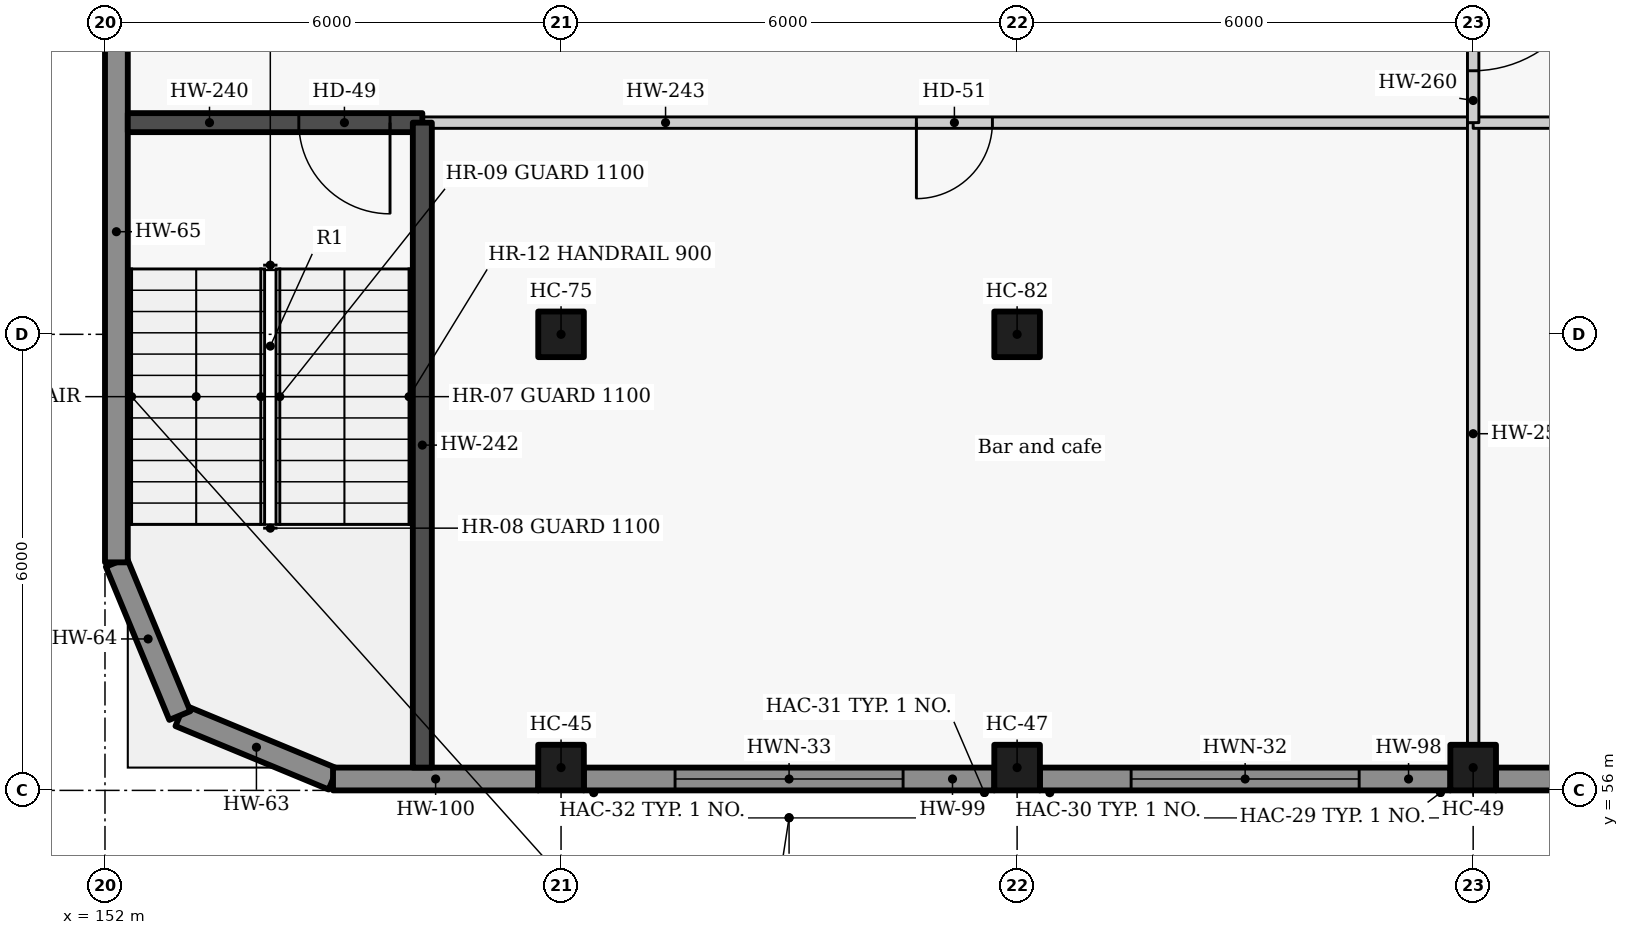
"""IFC4 building model, lengths in metres.
Left out: names, types, materials, properties, quantities, classifications, styles, units other than length and angle.
Written with IfcOpenShell. Run it as: python <this file> out.ifc"""

import sys

from ifc_helpers import new_model, si_unit, direction, frame, frame_2d, origin, origin_2d, place, context, subcontext, project, spatial, rectangle, extrude, element, fill, save


model = new_model("IFC4")
c1 = context("Model", 3, precision=1e-05, world=origin(), true_north=direction((0.0, 1.0)))
c2 = subcontext(c1, "Body", "Model", "MODEL_VIEW")
j1 = project(units=[si_unit("LENGTHUNIT", "METRE"), si_unit("PLANEANGLEUNIT", "RADIAN")], contexts=[c1])
p1 = place(None, origin())
s1 = spatial("IfcSite", under=j1, at=p1, CompositionType="ELEMENT")
p2 = place(p1, origin())
s2 = spatial("IfcBuilding", under=s1, at=p2, CompositionType="ELEMENT")
p3 = place(p2, frame((0.0, 0.0, 6.6)))
s3 = spatial("IfcBuildingStorey", under=s2, at=p3, CompositionType="ELEMENT", Elevation=6.6)
for number, where, z_axis, x_axis in (
    (1, (158.0, 56.3, 0.0), (0.0, 0.0, 1.0), (1.0, 0.0, 0.0)),
    (2, (164.0, 56.3, 0.0), (0.0, 0.0, 1.0), (1.0, 0.0, 0.0)),
    (3, (170.0, 56.3, 0.0), (0.0, 0.0, 1.0), (1.0, 0.0, 0.0)),
    (4, (158.0, 62.0, 0.0), (0.0, 0.0, 1.0), (1.0, 0.0, 0.0)),
    (5, (164.0, 62.0, 0.0), (0.0, 0.0, 1.0), (1.0, 0.0, 0.0)),
):
    element("IfcColumn", number, at=place(p3, frame(where, z_axis=z_axis, x_axis=x_axis)), inside=s3, PredefinedType="COLUMN", context=c2, shape_type="SweptSolid", body=[
        extrude(rectangle(XDim=0.6, YDim=0.6, at=origin_2d()), origin(), (0.0, 0.0, 1.0), 4.8),
    ])
for number, where, z_axis, x_axis in (
    (6, (155.0, 56.15, 0.0), (0.0, 0.0, 1.0), (-0.924, 0.383, 0.0)),
    (7, (152.985, 56.985, 0.0), (0.0, 0.0, 1.0), (-0.383, 0.924, 0.0)),
):
    element("IfcWall", number, at=place(p3, frame(where, z_axis=z_axis, x_axis=x_axis)), inside=s3, PredefinedType="SOLIDWALL", context=c2, shape_type="SweptSolid", body=[
        extrude(rectangle(XDim=2.181, YDim=0.3, at=frame_2d((1.091, 0.0))), origin(), (0.0, 0.0, 1.0), 4.8),
    ])
p4 = place(p3, frame((152.15, 59.0, 0.0), z_axis=(0.0, 0.0, 1.0), x_axis=(0.0, 1.0, 0.0)))
e8 = element("IfcWall", 8, at=p4, inside=s3, PredefinedType="SOLIDWALL", context=c2, shape_type="SweptSolid", body=[
    extrude(rectangle(XDim=8.7, YDim=0.3, at=frame_2d((4.35, 0.0))), origin(), (0.0, 0.0, 1.0), 4.8),
])
p5 = place(p3, frame((175.7, 56.15, 0.0), z_axis=(0.0, 0.0, 1.0), x_axis=(-1.0, 0.0, 0.0)))
e9 = element("IfcWall", 9, at=p5, inside=s3, PredefinedType="SOLIDWALL", context=c2, shape_type="SweptSolid", body=[
    extrude(rectangle(XDim=5.4, YDim=0.3, at=frame_2d((2.7, 0.0))), origin(), (0.0, 0.0, 1.0), 4.8),
])
p6 = place(p3, frame((169.7, 56.15, 0.0), z_axis=(0.0, 0.0, 1.0), x_axis=(-1.0, 0.0, 0.0)))
e10 = element("IfcWall", 10, at=p6, inside=s3, PredefinedType="SOLIDWALL", context=c2, shape_type="SweptSolid", body=[
    extrude(rectangle(XDim=5.4, YDim=0.3, at=frame_2d((2.7, 0.0))), origin(), (0.0, 0.0, 1.0), 4.8),
])
p7 = place(p6, frame((1.2, 0.0, 0.9)))
e11 = element("IfcOpeningElement", 11, at=p7, cuts=e10, PredefinedType="OPENING", context=c2, shape_type="SweptSolid", body=[
    extrude(rectangle(XDim=3.0, YDim=1.8, at=frame_2d((1.5, 0.9))), frame((0.0, 0.16, 0.0), z_axis=(0.0, -1.0, 0.0), x_axis=(1.0, 0.0, 0.0)), (0.0, 0.0, 1.0), 0.32),
])
p8 = place(p3, frame((163.7, 56.15, 0.0), z_axis=(0.0, 0.0, 1.0), x_axis=(-1.0, 0.0, 0.0)))
e12 = element("IfcWall", 12, at=p8, inside=s3, PredefinedType="SOLIDWALL", context=c2, shape_type="SweptSolid", body=[
    extrude(rectangle(XDim=5.4, YDim=0.3, at=frame_2d((2.7, 0.0))), origin(), (0.0, 0.0, 1.0), 4.8),
])
p9 = place(p8, frame((1.2, 0.0, 0.9)))
e13 = element("IfcOpeningElement", 13, at=p9, cuts=e12, PredefinedType="OPENING", context=c2, shape_type="SweptSolid", body=[
    extrude(rectangle(XDim=3.0, YDim=1.8, at=frame_2d((1.5, 0.9))), frame((0.0, 0.16, 0.0), z_axis=(0.0, -1.0, 0.0), x_axis=(1.0, 0.0, 0.0)), (0.0, 0.0, 1.0), 0.32),
])
p10 = place(p3, frame((157.7, 56.15, 0.0), z_axis=(0.0, 0.0, 1.0), x_axis=(-1.0, 0.0, 0.0)))
e14 = element("IfcWall", 14, at=p10, inside=s3, PredefinedType="SOLIDWALL", context=c2, shape_type="SweptSolid", body=[
    extrude(rectangle(XDim=2.7, YDim=0.3, at=frame_2d((1.35, 0.0))), origin(), (0.0, 0.0, 1.0), 4.8),
])
p11 = place(p3, frame((156.175, 64.785, 0.0), z_axis=(0.0, 0.0, 1.0), x_axis=(-1.0, 0.0, 0.0)))
e15 = element("IfcWall", 15, at=p11, inside=s3, PredefinedType="SOLIDWALL", context=c2, shape_type="SweptSolid", body=[
    extrude(rectangle(XDim=3.875, YDim=0.25, at=frame_2d((1.938, 0.0))), origin(), (0.0, 0.0, 1.0), 4.8),
])
p12 = place(p11, frame((0.425, 0.0, 0.0)))
e16 = element("IfcOpeningElement", 16, at=p12, cuts=e15, PredefinedType="OPENING", context=c2, shape_type="SweptSolid", body=[
    extrude(rectangle(XDim=1.2, YDim=2.1, at=frame_2d((0.6, 1.05))), frame((0.0, 0.135, 0.0), z_axis=(0.0, -1.0, 0.0), x_axis=(1.0, 0.0, 0.0)), (0.0, 0.0, 1.0), 0.27),
])
p13 = place(p3, frame((156.175, 64.785, 0.0), z_axis=(0.0, 0.0, 1.0), x_axis=(0.0, -1.0, 0.0)))
e17 = element("IfcWall", 17, at=p13, inside=s3, PredefinedType="SOLIDWALL", context=c2, shape_type="SweptSolid", body=[
    extrude(rectangle(XDim=8.485, YDim=0.25, at=frame_2d((4.242, 0.0))), origin(), (0.0, 0.0, 1.0), 4.8),
])
p14 = place(p3, frame((170.0, 64.785, 0.0), z_axis=(0.0, 0.0, 1.0), x_axis=(-1.0, 0.0, 0.0)))
e18 = element("IfcWall", 18, at=p14, inside=s3, PredefinedType="PARTITIONING", context=c2, shape_type="SweptSolid", body=[
    extrude(rectangle(XDim=13.825, YDim=0.15, at=frame_2d((6.913, 0.0))), origin(), (0.0, 0.0, 1.0), 4.45),
])
p15 = place(p14, frame((6.325, 0.0, 0.0)))
e19 = element("IfcOpeningElement", 19, at=p15, cuts=e18, PredefinedType="OPENING", context=c2, shape_type="SweptSolid", body=[
    extrude(rectangle(XDim=1.0, YDim=2.1, at=frame_2d((0.5, 1.05))), frame((0.0, 0.085, 0.0), z_axis=(0.0, -1.0, 0.0), x_axis=(1.0, 0.0, 0.0)), (0.0, 0.0, 1.0), 0.17),
])
p16 = place(p3, frame((170.0, 64.785, 0.0), z_axis=(0.0, 0.0, 1.0), x_axis=(0.0, -1.0, 0.0)))
e20 = element("IfcWall", 20, at=p16, inside=s3, PredefinedType="PARTITIONING", context=c2, shape_type="SweptSolid", body=[
    extrude(rectangle(XDim=8.185, YDim=0.15, at=frame_2d((4.092, 0.0))), origin(), (0.0, 0.0, 1.0), 4.45),
])
p17 = place(p3, frame((182.0, 64.785, 0.0), z_axis=(0.0, 0.0, 1.0), x_axis=(-1.0, 0.0, 0.0)))
e21 = element("IfcWall", 21, at=p17, inside=s3, PredefinedType="PARTITIONING", context=c2, shape_type="SweptSolid", body=[
    extrude(rectangle(XDim=12.0, YDim=0.15, at=frame_2d((6.0, 0.0))), origin(), (0.0, 0.0, 1.0), 4.45),
])
p18 = place(p17, frame((5.5, 0.0, 0.0)))
e22 = element("IfcOpeningElement", 22, at=p18, cuts=e21, PredefinedType="OPENING", context=c2, shape_type="SweptSolid", body=[
    extrude(rectangle(XDim=1.0, YDim=2.1, at=frame_2d((0.5, 1.05))), frame((0.0, 0.085, 0.0), z_axis=(0.0, -1.0, 0.0), x_axis=(1.0, 0.0, 0.0)), (0.0, 0.0, 1.0), 0.17),
])
p19 = place(p3, frame((170.0, 67.75, 0.0), z_axis=(0.0, 0.0, 1.0), x_axis=(0.0, -1.0, 0.0)))
e23 = element("IfcWall", 23, at=p19, inside=s3, PredefinedType="PARTITIONING", context=c2, shape_type="SweptSolid", body=[
    extrude(rectangle(XDim=2.965, YDim=0.15, at=frame_2d((1.482, 0.0))), origin(), (0.0, 0.0, 1.0), 4.45),
])
p20 = place(p19, frame((0.683, 0.0, 0.0)))
e24 = element("IfcOpeningElement", 24, at=p20, cuts=e23, PredefinedType="OPENING", context=c2, shape_type="SweptSolid", body=[
    extrude(rectangle(XDim=1.6, YDim=2.1, at=frame_2d((0.8, 1.05))), frame((0.0, 0.085, 0.0), z_axis=(0.0, -1.0, 0.0), x_axis=(1.0, 0.0, 0.0)), (0.0, 0.0, 1.0), 0.17),
])
p21 = place(p7, origin())
e25 = element("IfcWindow", 25, at=p21, inside=s3, PartitioningType="SINGLE_PANEL", PredefinedType="WINDOW", context=c2, shape_type="SweptSolid", body=[
    extrude(rectangle(XDim=3.0, YDim=1.8, at=frame_2d((1.5, 0.9))), frame((0.0, 0.03, 0.0), z_axis=(0.0, -1.0, 0.0), x_axis=(1.0, 0.0, 0.0)), (0.0, 0.0, 1.0), 0.06),
])
fill(e11, e25)
p22 = place(p9, origin())
e26 = element("IfcWindow", 26, at=p22, inside=s3, PartitioningType="SINGLE_PANEL", PredefinedType="WINDOW", context=c2, shape_type="SweptSolid", body=[
    extrude(rectangle(XDim=3.0, YDim=1.8, at=frame_2d((1.5, 0.9))), frame((0.0, 0.03, 0.0), z_axis=(0.0, -1.0, 0.0), x_axis=(1.0, 0.0, 0.0)), (0.0, 0.0, 1.0), 0.06),
])
fill(e13, e26)
p23 = place(p12, origin())
e27 = element("IfcDoor", 27, at=p23, inside=s3, OperationType="SINGLE_SWING_LEFT", PredefinedType="DOOR", context=c2, shape_type="SweptSolid", body=[
    extrude(rectangle(XDim=1.2, YDim=2.1, at=frame_2d((0.6, 1.05))), frame((0.0, 0.025, 0.0), z_axis=(0.0, -1.0, 0.0), x_axis=(1.0, 0.0, 0.0)), (0.0, 0.0, 1.0), 0.05),
])
fill(e16, e27)
p24 = place(p15, origin())
e28 = element("IfcDoor", 28, at=p24, inside=s3, OperationType="SINGLE_SWING_RIGHT", PredefinedType="DOOR", context=c2, shape_type="SweptSolid", body=[
    extrude(rectangle(XDim=1.0, YDim=2.1, at=frame_2d((0.5, 1.05))), frame((0.0, 0.025, 0.0), z_axis=(0.0, -1.0, 0.0), x_axis=(1.0, 0.0, 0.0)), (0.0, 0.0, 1.0), 0.05),
])
fill(e19, e28)
p25 = place(p20, origin())
e29 = element("IfcDoor", 29, at=p25, inside=s3, OperationType="DOUBLE_DOOR_SINGLE_SWING", PredefinedType="DOOR", context=c2, shape_type="SweptSolid", body=[
    extrude(rectangle(XDim=1.6, YDim=2.1, at=frame_2d((0.8, 1.05))), frame((0.0, 0.025, 0.0), z_axis=(0.0, -1.0, 0.0), x_axis=(1.0, 0.0, 0.0)), (0.0, 0.0, 1.0), 0.05),
])
fill(e24, e29)
save(model, sys.argv[1])
